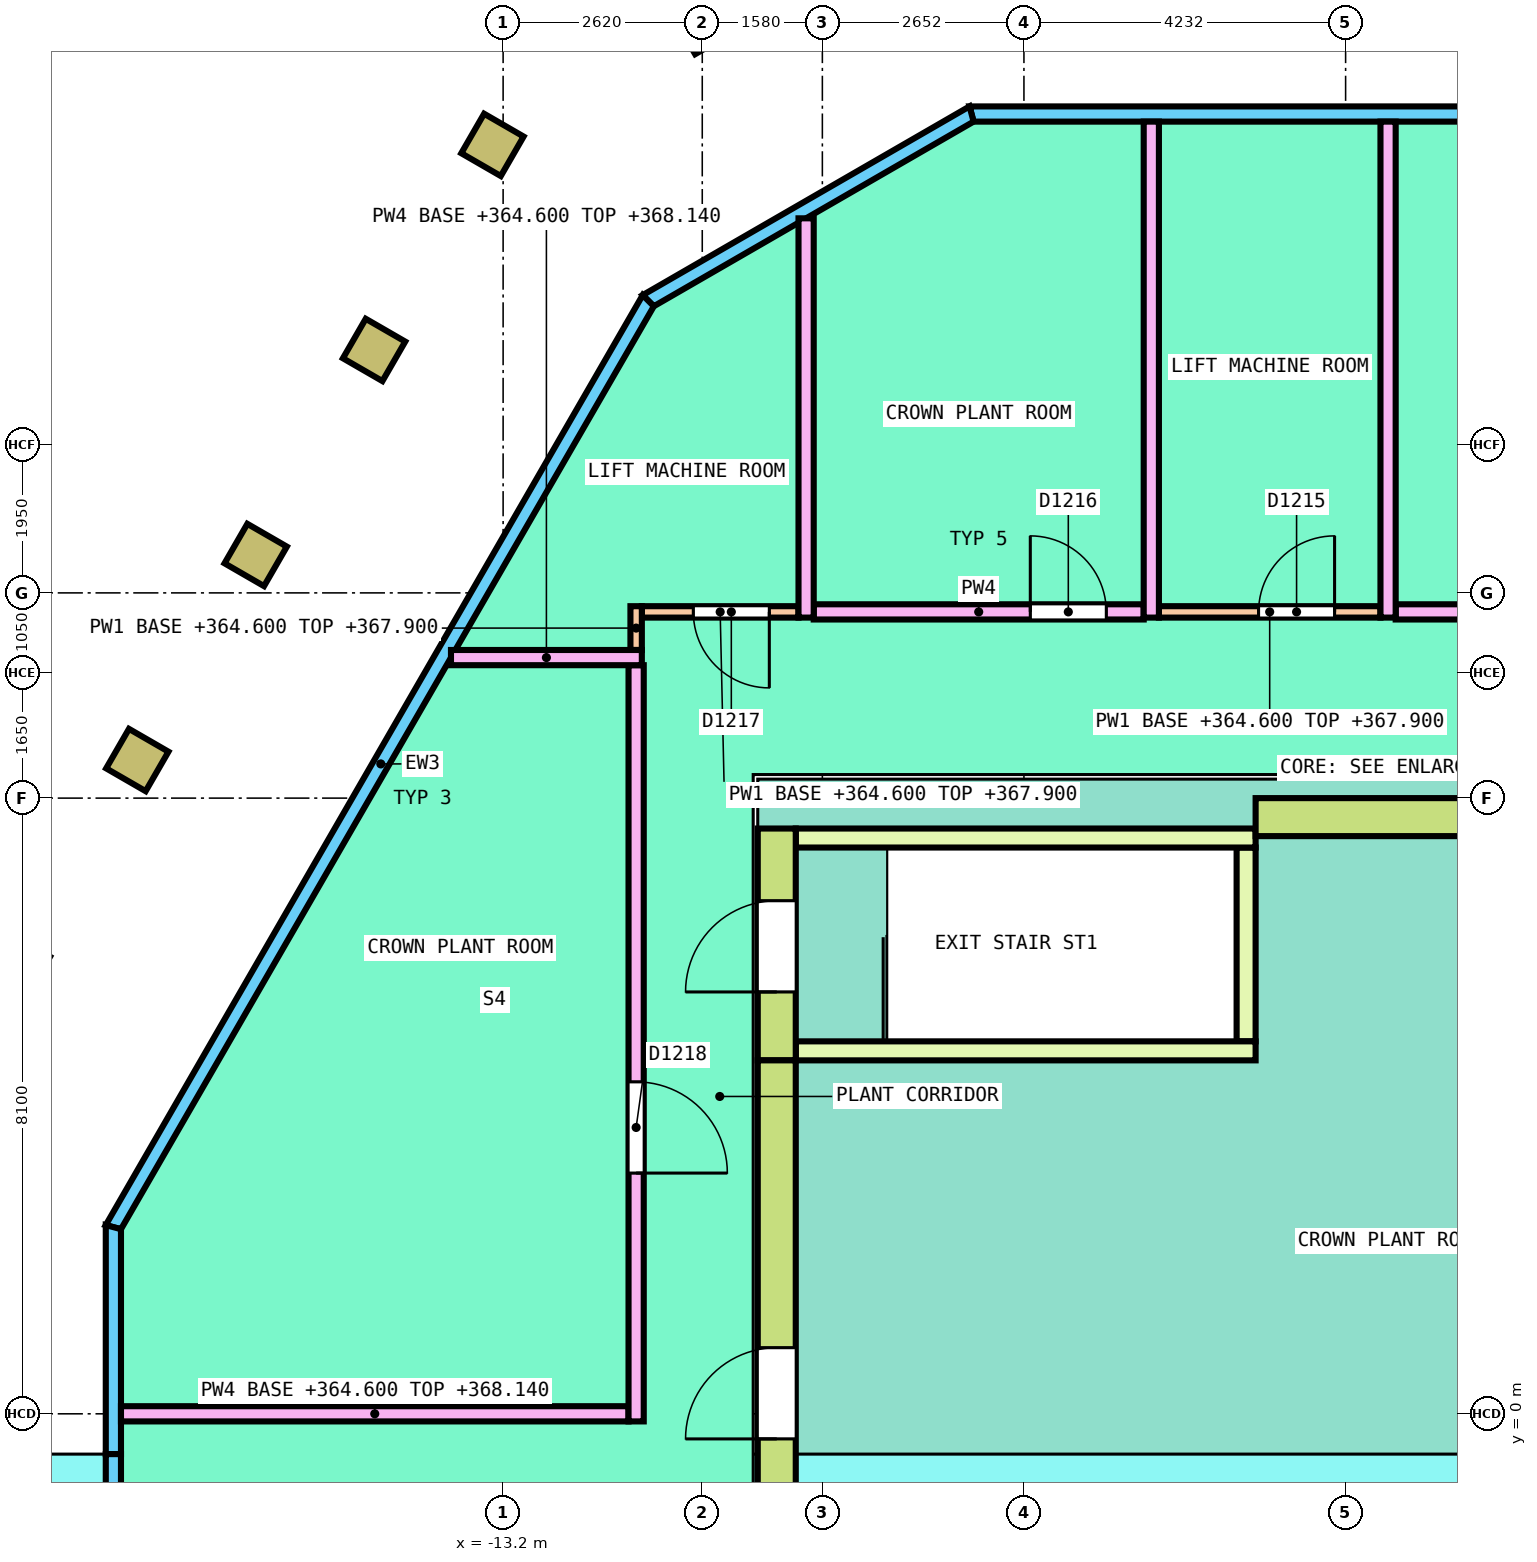
"""IFC4 building model, lengths in metres.
Left out: names, types, materials, properties, quantities, classifications, styles, units other than length and angle.
Written with IfcOpenShell. Run it as: python <this file> out.ifc"""

import sys

from ifc_helpers import new_model, si_unit, direction, frame, frame_2d, origin, origin_2d, place, context, subcontext, project, spatial, polyline, rectangle, hollow_rectangle, outline, extrude, element, fill, save


model = new_model("IFC4")
c1 = context("Model", 3, precision=1e-05, world=origin(), true_north=direction((0.0, 1.0)))
c2 = subcontext(c1, "Body", "Model", "MODEL_VIEW")
j1 = project(units=[si_unit("LENGTHUNIT", "METRE"), si_unit("PLANEANGLEUNIT", "RADIAN")], contexts=[c1])
p1 = place(None, origin())
s1 = spatial("IfcSite", under=j1, at=p1, CompositionType="ELEMENT")
p2 = place(p1, origin())
s2 = spatial("IfcBuilding", under=s1, at=p2, CompositionType="ELEMENT")
p3 = place(p2, frame((0.0, 0.0, 364.6)))
s3 = spatial("IfcBuildingStorey", under=s2, at=p3, CompositionType="ELEMENT", Elevation=364.6)
for number, where, z_axis, x_axis in (
    (1, (-13.34, 16.694, 0.0), (0.0, 0.0, 1.0), (-0.5, -0.866, 0.0)),
    (2, (-14.898, 13.996, 0.0), (0.0, 0.0, 1.0), (-0.5, -0.866, 0.0)),
    (3, (-16.455, 11.299, 0.0), (0.0, 0.0, 1.0), (-0.5, -0.866, 0.0)),
    (4, (-18.013, 8.601, 0.0), (0.0, 0.0, 1.0), (-0.5, -0.866, 0.0)),
):
    element("IfcColumn", number, at=place(p3, frame(where, z_axis=z_axis, x_axis=x_axis)), inside=s3, PredefinedType="COLUMN", context=c2, shape_type="SweptSolid", body=[
        extrude(hollow_rectangle(XDim=0.6, YDim=0.6, WallThickness=0.04, InnerFilletRadius=0.04, OuterFilletRadius=0.08, at=origin_2d()), origin(), (0.0, 0.0, 1.0), 4.0),
    ])
p4 = place(p3, frame((7.037, 17.1, 0.0), z_axis=(0.0, 0.0, 1.0), x_axis=(-1.0, 0.0, 0.0)))
e5 = element("IfcWall", 5, at=p4, inside=s3, PredefinedType="SOLIDWALL", context=c2, shape_type="SweptSolid", body=[
    extrude(outline(polyline([(-0.027, -0.1), (14.101, -0.1), (14.047, 0.1), (0.027, 0.1), (-0.027, -0.1)])), origin(), (0.0, 0.0, 1.0), 3.8),
])
p5 = place(p3, frame((-7.037, 17.1, 0.0), z_axis=(0.0, 0.0, 1.0), x_axis=(-0.86601671623, -0.500015046984, 0.0)))
e6 = element("IfcWall", 6, at=p5, inside=s3, PredefinedType="SOLIDWALL", context=c2, shape_type="SweptSolid", body=[
    extrude(outline(polyline([(-0.027, -0.1), (4.938, -0.1), (4.885, 0.1), (0.027, 0.1), (-0.027, -0.1)])), origin(), (0.0, 0.0, 1.0), 3.8),
])
p6 = place(p3, frame((-11.291, 14.644, 0.0), z_axis=(0.0, 0.0, 1.0), x_axis=(-0.499991740577, -0.866030172312, 0.0)))
e7 = element("IfcWall", 7, at=p6, inside=s3, PredefinedType="SOLIDWALL", context=c2, shape_type="SweptSolid", body=[
    extrude(outline(polyline([(-0.027, -0.1), (14.101, -0.1), (14.047, 0.1), (0.027, 0.1), (-0.027, -0.1)])), origin(), (0.0, 0.0, 1.0), 3.8),
])
p7 = place(p3, frame((-18.327, 2.456, 0.0), z_axis=(0.0, 0.0, 1.0), x_axis=(0.0, -1.0, 0.0)))
e8 = element("IfcWall", 8, at=p7, inside=s3, PredefinedType="SOLIDWALL", context=c2, shape_type="SweptSolid", body=[
    extrude(outline(polyline([(-0.027, -0.1), (2.986, -0.1), (2.986, 0.1), (0.027, 0.1), (-0.027, -0.1)])), origin(), (0.0, 0.0, 1.0), 3.8),
])
p8 = place(p3, frame((-18.327, -0.53, 0.0), z_axis=(0.0, 0.0, 1.0), x_axis=(0.0, -1.0, 0.0)))
e9 = element("IfcWall", 9, at=p8, inside=s3, PredefinedType="SOLIDWALL", context=c2, shape_type="SweptSolid", body=[
    extrude(outline(polyline([(0.0, 0.0), (1.926, 0.0), (1.926, 2.074), (0.0, 4.0), (0.0, 0.0)])), frame((0.0, 0.1, 0.0), z_axis=(0.0, -1.0, 0.0), x_axis=(1.0, 0.0, 0.0)), (0.0, 0.0, 1.0), 0.2),
])
p9 = place(p3, frame((3.3, 7.85, 0.0), z_axis=(0.0, 0.0, 1.0), x_axis=(-1.0, 0.0, 0.0)))
e10 = element("IfcWall", 10, at=p9, inside=s3, PredefinedType="SHEAR", context=c2, shape_type="SweptSolid", body=[
    extrude(rectangle(XDim=6.6, YDim=0.5, at=frame_2d((3.3, 0.0))), origin(), (0.0, 0.0, 1.0), 3.8),
])
p10 = place(p3, frame((-9.6, 4.65, 0.0), z_axis=(0.0, 0.0, 1.0), x_axis=(0.0, -1.0, 0.0)))
e11 = element("IfcWall", 11, at=p10, inside=s3, PredefinedType="SHEAR", context=c2, shape_type="SweptSolid", body=[
    extrude(outline(polyline([(0.0, 0.0), (8.78, 0.0), (8.78, 0.4), (5.18, 3.8), (0.0, 3.8), (0.0, 0.0)])), frame((0.0, 0.25, 0.0), z_axis=(0.0, -1.0, 0.0), x_axis=(1.0, 0.0, 0.0)), (0.0, 0.0, 1.0), 0.5),
])
p11 = place(p10, frame((3.78, 0.0, 0.0)))
e12 = element("IfcOpeningElement", 12, at=p11, cuts=e11, PredefinedType="OPENING", context=c2, shape_type="SweptSolid", body=[
    extrude(rectangle(XDim=1.2, YDim=2.1, at=frame_2d((0.6, 1.05))), frame((0.0, 0.26, 0.0), z_axis=(0.0, -1.0, 0.0), x_axis=(1.0, 0.0, 0.0)), (0.0, 0.0, 1.0), 0.52),
])
p12 = place(p3, frame((-9.6, 4.65, 0.0), z_axis=(0.0, 0.0, 1.0), x_axis=(0.0, 1.0, 0.0)))
e13 = element("IfcWall", 13, at=p12, inside=s3, PredefinedType="SHEAR", context=c2, shape_type="SweptSolid", body=[
    extrude(rectangle(XDim=3.05, YDim=0.5, at=frame_2d((1.525, 0.0))), origin(), (0.0, 0.0, 1.0), 3.8),
])
p13 = place(p12, frame((0.9, 0.0, 0.0)))
e14 = element("IfcOpeningElement", 14, at=p13, cuts=e13, PredefinedType="OPENING", context=c2, shape_type="SweptSolid", body=[
    extrude(rectangle(XDim=1.2, YDim=2.1, at=frame_2d((0.6, 1.05))), frame((0.0, 0.26, 0.0), z_axis=(0.0, -1.0, 0.0), x_axis=(1.0, 0.0, 0.0)), (0.0, 0.0, 1.0), 0.52),
])
p14 = place(p3, frame((-3.425, 4.9, 0.0), z_axis=(0.0, 0.0, 1.0), x_axis=(0.0, 1.0, 0.0)))
e15 = element("IfcWall", 15, at=p14, inside=s3, PredefinedType="SOLIDWALL", context=c2, shape_type="SweptSolid", body=[
    extrude(rectangle(XDim=2.55, YDim=0.25, at=frame_2d((1.275, 0.0))), origin(), (0.0, 0.0, 1.0), 3.8),
])
for number, where, z_axis, x_axis in (
    (16, (-9.35, 4.775, 0.0), (0.0, 0.0, 1.0), (1.0, 0.0, 0.0)),
    (17, (-9.35, 7.575, 0.0), (0.0, 0.0, 1.0), (1.0, 0.0, 0.0)),
):
    element("IfcWall", number, at=place(p3, frame(where, z_axis=z_axis, x_axis=x_axis)), inside=s3, PredefinedType="SOLIDWALL", context=c2, shape_type="SweptSolid", body=[
        extrude(rectangle(XDim=6.05, YDim=0.25, at=frame_2d((3.025, 0.0))), origin(), (0.0, 0.0, 1.0), 3.8),
    ])
p15 = place(p3, frame((-11.375, 10.55, 0.0), z_axis=(0.0, 0.0, 1.0), x_axis=(1.0, 0.0, 0.0)))
e18 = element("IfcWall", 18, at=p15, inside=s3, PredefinedType="PARTITIONING", context=c2, shape_type="SweptSolid", body=[
    extrude(rectangle(XDim=2.061, YDim=0.15, at=frame_2d((1.031, 0.0))), origin(), (0.0, 0.0, 1.0), 3.3),
])
p16 = place(p15, frame((0.677, 0.0, 0.0)))
e19 = element("IfcOpeningElement", 19, at=p16, cuts=e18, PredefinedType="OPENING", context=c2, shape_type="SweptSolid", body=[
    extrude(rectangle(XDim=1.0, YDim=2.1, at=frame_2d((0.5, 1.05))), frame((0.0, 0.085, 0.0), z_axis=(0.0, -1.0, 0.0), x_axis=(1.0, 0.0, 0.0)), (0.0, 0.0, 1.0), 0.17),
])
p17 = place(p3, frame((-4.572, 10.55, 0.0), z_axis=(0.0, 0.0, 1.0), x_axis=(1.0, 0.0, 0.0)))
e20 = element("IfcWall", 20, at=p17, inside=s3, PredefinedType="PARTITIONING", context=c2, shape_type="SweptSolid", body=[
    extrude(rectangle(XDim=2.915, YDim=0.15, at=frame_2d((1.458, 0.0))), origin(), (0.0, 0.0, 1.0), 3.3),
])
p18 = place(p17, frame((1.311, 0.0, 0.0)))
e21 = element("IfcOpeningElement", 21, at=p18, cuts=e20, PredefinedType="OPENING", context=c2, shape_type="SweptSolid", body=[
    extrude(rectangle(XDim=1.0, YDim=2.1, at=frame_2d((0.5, 1.05))), frame((0.0, 0.085, 0.0), z_axis=(0.0, -1.0, 0.0), x_axis=(1.0, 0.0, 0.0)), (0.0, 0.0, 1.0), 0.17),
])
p19 = place(p3, frame((-11.45, 10.049, 0.0), z_axis=(0.0, 0.0, 1.0), x_axis=(0.0, 1.0, 0.0)))
e22 = element("IfcWall", 22, at=p19, inside=s3, PredefinedType="PARTITIONING", context=c2, shape_type="SweptSolid", body=[
    extrude(rectangle(XDim=0.576, YDim=0.15, at=frame_2d((0.288, 0.0))), origin(), (0.0, 0.0, 1.0), 3.3),
])
p20 = place(p3, frame((-9.114, 10.55, 0.0), z_axis=(0.0, 0.0, 1.0), x_axis=(1.0, 0.0, 0.0)))
e23 = element("IfcWall", 23, at=p20, inside=s3, PredefinedType="PARTITIONING", context=c2, shape_type="SweptSolid", body=[
    extrude(rectangle(XDim=4.342, YDim=0.2, at=frame_2d((2.171, 0.0))), origin(), (0.0, 0.0, 1.0), 3.3),
])
p21 = place(p20, frame((2.85, 0.0, 0.0)))
e24 = element("IfcOpeningElement", 24, at=p21, cuts=e23, PredefinedType="OPENING", context=c2, shape_type="SweptSolid", body=[
    extrude(rectangle(XDim=1.0, YDim=2.1, at=frame_2d((0.5, 1.05))), frame((0.0, 0.11, 0.0), z_axis=(0.0, -1.0, 0.0), x_axis=(1.0, 0.0, 0.0)), (0.0, 0.0, 1.0), 0.22),
])
p22 = place(p3, frame((-1.458, 10.55, 0.0), z_axis=(0.0, 0.0, 1.0), x_axis=(1.0, 0.0, 0.0)))
e25 = element("IfcWall", 25, at=p22, inside=s3, PredefinedType="PARTITIONING", context=c2, shape_type="SweptSolid", body=[
    extrude(rectangle(XDim=12.808, YDim=0.2, at=frame_2d((6.404, 0.0))), origin(), (0.0, 0.0, 1.0), 3.3),
])
p23 = place(p22, frame((4.686, 0.0, 0.0)))
e26 = element("IfcOpeningElement", 26, at=p23, cuts=e25, PredefinedType="OPENING", context=c2, shape_type="SweptSolid", body=[
    extrude(rectangle(XDim=1.2, YDim=2.1, at=frame_2d((0.6, 1.05))), frame((0.0, 0.11, 0.0), z_axis=(0.0, -1.0, 0.0), x_axis=(1.0, 0.0, 0.0)), (0.0, 0.0, 1.0), 0.22),
])
p24 = place(p3, frame((-18.228, 0.0, 0.0), z_axis=(0.0, 0.0, 1.0), x_axis=(1.0, 0.0, 0.0)))
e27 = element("IfcWall", 27, at=p24, inside=s3, PredefinedType="PARTITIONING", context=c2, shape_type="SweptSolid", body=[
    extrude(rectangle(XDim=6.677, YDim=0.2, at=frame_2d((3.339, 0.0))), origin(), (0.0, 0.0, 1.0), 3.54),
])
p25 = place(p3, frame((-11.45, -0.1, 0.0), z_axis=(0.0, 0.0, 1.0), x_axis=(0.0, 1.0, 0.0)))
e28 = element("IfcWall", 28, at=p25, inside=s3, PredefinedType="PARTITIONING", context=c2, shape_type="SweptSolid", body=[
    extrude(rectangle(XDim=9.949, YDim=0.2, at=frame_2d((4.975, 0.0))), origin(), (0.0, 0.0, 1.0), 3.3),
])
p26 = place(p25, frame((3.267, 0.0, 0.0)))
e29 = element("IfcOpeningElement", 29, at=p26, cuts=e28, PredefinedType="OPENING", context=c2, shape_type="SweptSolid", body=[
    extrude(rectangle(XDim=1.2, YDim=2.1, at=frame_2d((0.6, 1.05))), frame((0.0, 0.11, 0.0), z_axis=(0.0, -1.0, 0.0), x_axis=(1.0, 0.0, 0.0)), (0.0, 0.0, 1.0), 0.22),
])
for number, where, z_axis, x_axis in (
    (30, (-1.557, 10.475, 0.0), (0.0, 0.0, 1.0), (0.0, 1.0, 0.0)),
    (31, (-4.672, 10.475, 0.0), (0.0, 0.0, 1.0), (0.0, 1.0, 0.0)),
):
    element("IfcWall", number, at=place(p3, frame(where, z_axis=z_axis, x_axis=x_axis)), inside=s3, PredefinedType="PARTITIONING", context=c2, shape_type="SweptSolid", body=[
        extrude(rectangle(XDim=6.525, YDim=0.2, at=frame_2d((3.262, 0.0))), origin(), (0.0, 0.0, 1.0), 3.3),
    ])
p27 = place(p3, frame((-9.214, 10.475, 0.0), z_axis=(0.0, 0.0, 1.0), x_axis=(0.0, 1.0, 0.0)))
e32 = element("IfcWall", 32, at=p27, inside=s3, PredefinedType="PARTITIONING", context=c2, shape_type="SweptSolid", body=[
    extrude(rectangle(XDim=5.253, YDim=0.2, at=frame_2d((2.626, 0.0))), origin(), (0.0, 0.0, 1.0), 3.3),
])
p28 = place(p3, frame((-13.886, 9.949, 0.0), z_axis=(0.0, 0.0, 1.0), x_axis=(1.0, 0.0, 0.0)))
e33 = element("IfcWall", 33, at=p28, inside=s3, PredefinedType="PARTITIONING", context=c2, shape_type="SweptSolid", body=[
    extrude(rectangle(XDim=2.511, YDim=0.2, at=frame_2d((1.255, 0.0))), origin(), (0.0, 0.0, 1.0), 3.54),
])
p29 = place(p13, origin())
e34 = element("IfcDoor", 34, at=p29, inside=s3, OperationType="SINGLE_SWING_LEFT", PredefinedType="DOOR", context=c2, shape_type="SweptSolid", body=[
    extrude(rectangle(XDim=1.2, YDim=2.1, at=frame_2d((0.6, 1.05))), frame((0.0, 0.2, 0.0), z_axis=(0.0, -1.0, 0.0), x_axis=(1.0, 0.0, 0.0)), (0.0, 0.0, 1.0), 0.4),
])
fill(e14, e34)
p30 = place(p11, origin())
e35 = element("IfcDoor", 35, at=p30, inside=s3, OperationType="SINGLE_SWING_LEFT", PredefinedType="DOOR", context=c2, shape_type="SweptSolid", body=[
    extrude(rectangle(XDim=1.2, YDim=2.1, at=frame_2d((0.6, 1.05))), frame((0.0, 0.2, 0.0), z_axis=(0.0, -1.0, 0.0), x_axis=(1.0, 0.0, 0.0)), (0.0, 0.0, 1.0), 0.4),
])
fill(e12, e35)
p31 = place(p18, origin())
e36 = element("IfcDoor", 36, at=p31, inside=s3, OperationType="SINGLE_SWING_LEFT", PredefinedType="DOOR", context=c2, shape_type="SweptSolid", body=[
    extrude(rectangle(XDim=1.0, YDim=2.1, at=frame_2d((0.5, 1.05))), frame((0.0, 0.025, 0.0), z_axis=(0.0, -1.0, 0.0), x_axis=(1.0, 0.0, 0.0)), (0.0, 0.0, 1.0), 0.05),
])
fill(e21, e36)
p32 = place(p21, origin())
e37 = element("IfcDoor", 37, at=p32, inside=s3, OperationType="SINGLE_SWING_RIGHT", PredefinedType="DOOR", context=c2, shape_type="SweptSolid", body=[
    extrude(rectangle(XDim=1.0, YDim=2.1, at=frame_2d((0.5, 1.05))), frame((0.0, 0.025, 0.0), z_axis=(0.0, -1.0, 0.0), x_axis=(1.0, 0.0, 0.0)), (0.0, 0.0, 1.0), 0.05),
])
fill(e24, e37)
p33 = place(p16, origin())
e38 = element("IfcDoor", 38, at=p33, inside=s3, OperationType="SINGLE_SWING_RIGHT", PredefinedType="DOOR", context=c2, shape_type="SweptSolid", body=[
    extrude(rectangle(XDim=1.0, YDim=2.1, at=frame_2d((0.5, 1.05))), frame((0.0, 0.025, 0.0), z_axis=(0.0, -1.0, 0.0), x_axis=(1.0, 0.0, 0.0)), (0.0, 0.0, 1.0), 0.05),
])
fill(e19, e38)
p34 = place(p26, origin())
e39 = element("IfcDoor", 39, at=p34, inside=s3, OperationType="DOUBLE_DOOR_SINGLE_SWING", PredefinedType="DOOR", context=c2, shape_type="SweptSolid", body=[
    extrude(rectangle(XDim=1.2, YDim=2.1, at=frame_2d((0.6, 1.05))), frame((0.0, 0.025, 0.0), z_axis=(0.0, -1.0, 0.0), x_axis=(1.0, 0.0, 0.0)), (0.0, 0.0, 1.0), 0.05),
])
fill(e29, e39)
save(model, sys.argv[1])
